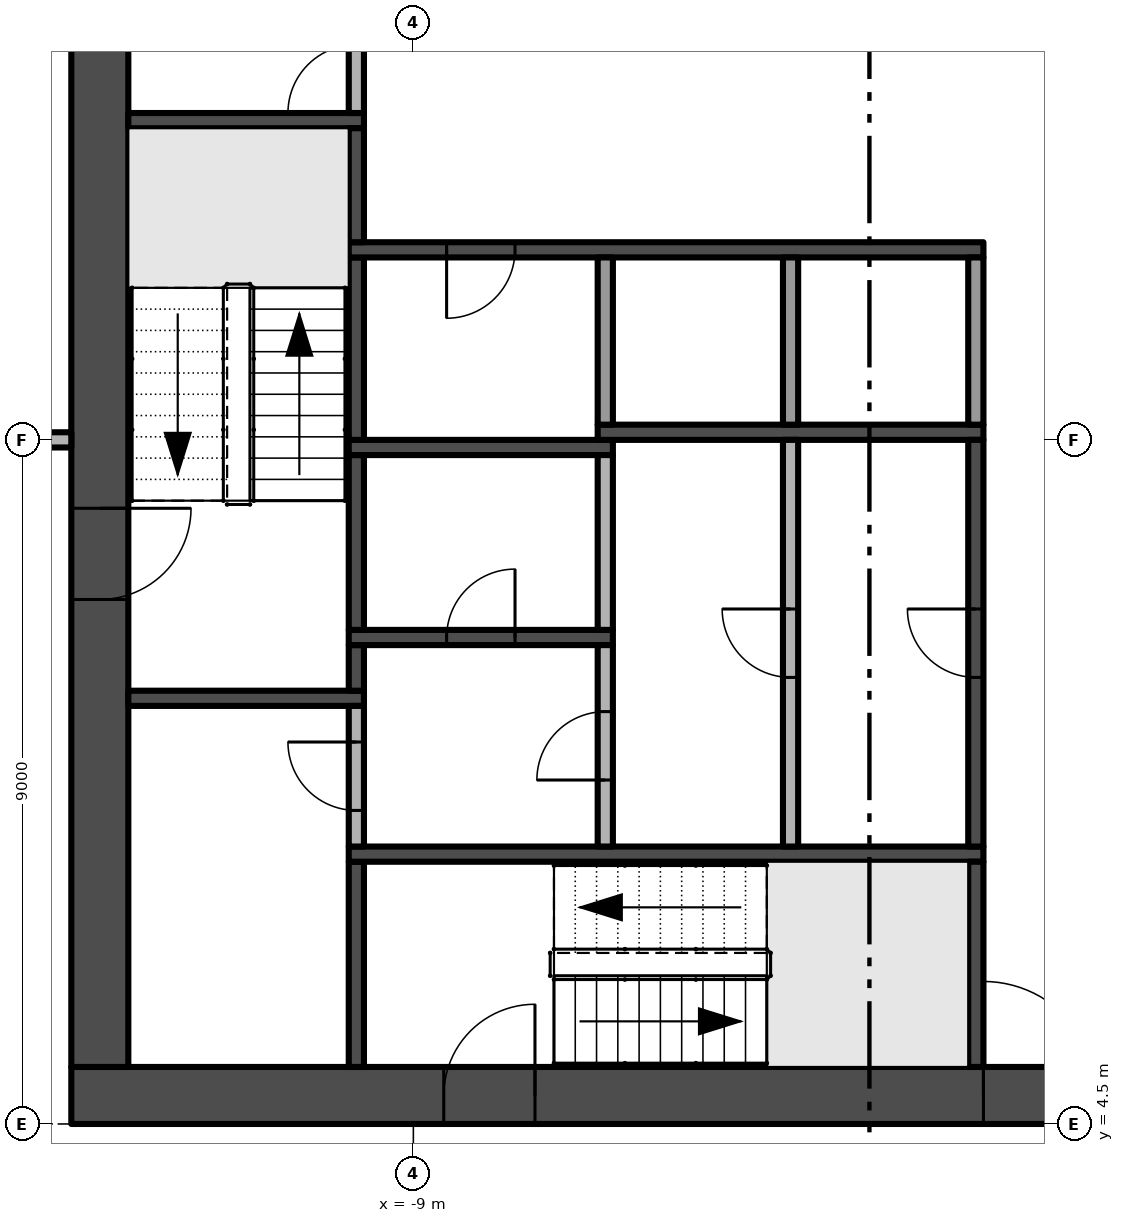
"""IFC4 building model, lengths in metres.
Left out: names, types, materials, properties, quantities, classifications, styles, units other than length and angle.
Written with IfcOpenShell. Run it as: python <this file> out.ifc"""

import sys

from ifc_helpers import new_model, si_unit, direction, frame, frame_2d, origin, place, context, subcontext, project, spatial, rectangle, extrude, element, fill, save


model = new_model("IFC4")
c1 = context("Model", 3, precision=1e-05, world=origin(), true_north=direction((0.0, 1.0)))
c2 = subcontext(c1, "Body", "Model", "MODEL_VIEW")
j1 = project(units=[si_unit("LENGTHUNIT", "METRE"), si_unit("PLANEANGLEUNIT", "RADIAN")], contexts=[c1])
p1 = place(None, origin())
s1 = spatial("IfcSite", under=j1, at=p1, CompositionType="ELEMENT")
p2 = place(p1, origin())
s2 = spatial("IfcBuilding", under=s1, at=p2, CompositionType="ELEMENT")
p3 = place(p2, frame((0.0, 0.0, 128.8)))
s3 = spatial("IfcBuildingStorey", under=s2, at=p3, CompositionType="ELEMENT", Elevation=128.8)
p4 = place(p3, frame((-13.5, 4.875, -0.3), z_axis=(0.0, 0.0, 1.0), x_axis=(1.0, 0.0, 0.0)))
e1 = element("IfcWall", 1, at=p4, inside=s3, PredefinedType="SHEAR", context=c2, shape_type="SweptSolid", body=[
    extrude(rectangle(XDim=27.0, YDim=0.75, at=frame_2d((13.5, 0.0))), origin(), (0.0, 0.0, 1.0), 3.8),
])
p5 = place(p4, frame((12.0, 0.0, 0.3)))
e2 = element("IfcOpeningElement", 2, at=p5, cuts=e1, PredefinedType="OPENING", context=c2, shape_type="SweptSolid", body=[
    extrude(rectangle(XDim=3.0, YDim=2.4, at=frame_2d((1.5, 1.2))), frame((0.0, 0.385, 0.0), z_axis=(0.0, -1.0, 0.0), x_axis=(1.0, 0.0, 0.0)), (0.0, 0.0, 1.0), 0.77),
])
p6 = place(p4, frame((4.9, 0.0, 0.3)))
e3 = element("IfcOpeningElement", 3, at=p6, cuts=e1, PredefinedType="OPENING", context=c2, shape_type="SweptSolid", body=[
    extrude(rectangle(XDim=1.2, YDim=2.2, at=frame_2d((0.6, 1.1))), frame((0.0, 0.385, 0.0), z_axis=(0.0, -1.0, 0.0), x_axis=(1.0, 0.0, 0.0)), (0.0, 0.0, 1.0), 0.77),
])
p7 = place(p4, frame((20.75, 0.0, 0.3)))
e4 = element("IfcOpeningElement", 4, at=p7, cuts=e1, PredefinedType="OPENING", context=c2, shape_type="SweptSolid", body=[
    extrude(rectangle(XDim=1.5, YDim=2.2, at=frame_2d((0.75, 1.1))), frame((0.0, 0.385, 0.0), z_axis=(0.0, -1.0, 0.0), x_axis=(1.0, 0.0, 0.0)), (0.0, 0.0, 1.0), 0.77),
])
p8 = place(p4, frame((17.4, 0.0, 0.3)))
e5 = element("IfcOpeningElement", 5, at=p8, cuts=e1, PredefinedType="OPENING", context=c2, shape_type="SweptSolid", body=[
    extrude(rectangle(XDim=1.2, YDim=2.2, at=frame_2d((0.6, 1.1))), frame((0.0, 0.385, 0.0), z_axis=(0.0, -1.0, 0.0), x_axis=(1.0, 0.0, 0.0)), (0.0, 0.0, 1.0), 0.77),
])
p9 = place(p3, frame((-13.125, 21.75, -0.3), z_axis=(0.0, 0.0, 1.0), x_axis=(0.0, -1.0, 0.0)))
e6 = element("IfcWall", 6, at=p9, inside=s3, PredefinedType="SHEAR", context=c2, shape_type="SweptSolid", body=[
    extrude(rectangle(XDim=16.5, YDim=0.75, at=frame_2d((8.25, 0.0))), origin(), (0.0, 0.0, 1.0), 3.8),
])
p10 = place(p9, frame((9.15, 0.0, 0.3)))
e7 = element("IfcOpeningElement", 7, at=p10, cuts=e6, PredefinedType="OPENING", context=c2, shape_type="SweptSolid", body=[
    extrude(rectangle(XDim=1.2, YDim=2.2, at=frame_2d((0.6, 1.1))), frame((0.0, 0.385, 0.0), z_axis=(0.0, -1.0, 0.0), x_axis=(1.0, 0.0, 0.0)), (0.0, 0.0, 1.0), 0.77),
])
for number, where, z_axis, x_axis in (
    (8, (-12.75, 10.1, 0.0), (0.0, 0.0, 1.0), (1.0, 0.0, 0.0)),
    (9, (-12.75, 17.7, 0.0), (0.0, 0.0, 1.0), (1.0, 0.0, 0.0)),
):
    element("IfcWall", number, at=place(p3, frame(where, z_axis=z_axis, x_axis=x_axis)), inside=s3, PredefinedType="SHEAR", context=c2, shape_type="SweptSolid", body=[
        extrude(rectangle(XDim=3.1, YDim=0.2, at=frame_2d((1.55, 0.0))), origin(), (0.0, 0.0, 1.0), 3.5),
    ])
p11 = place(p3, frame((-9.75, 5.25, 0.0), z_axis=(0.0, 0.0, 1.0), x_axis=(0.0, 1.0, 0.0)))
e10 = element("IfcWall", 10, at=p11, inside=s3, PredefinedType="SHEAR", context=c2, shape_type="SweptSolid", body=[
    extrude(rectangle(XDim=2.7, YDim=0.2, at=frame_2d((1.35, 0.0))), origin(), (0.0, 0.0, 1.0), 3.5),
])
p12 = place(p3, frame((-9.85, 8.05, 0.0), z_axis=(0.0, 0.0, 1.0), x_axis=(1.0, 0.0, 0.0)))
e11 = element("IfcWall", 11, at=p12, inside=s3, PredefinedType="SHEAR", context=c2, shape_type="SweptSolid", body=[
    extrude(rectangle(XDim=8.35, YDim=0.2, at=frame_2d((4.175, 0.0))), origin(), (0.0, 0.0, 1.0), 3.5),
])
p13 = place(p3, frame((-9.75, 8.15, 0.0), z_axis=(0.0, 0.0, 1.0), x_axis=(0.0, 1.0, 0.0)))
e12 = element("IfcWall", 12, at=p13, inside=s3, PredefinedType="PARTITIONING", context=c2, shape_type="SweptSolid", body=[
    extrude(rectangle(XDim=1.85, YDim=0.2, at=frame_2d((0.925, 0.0))), origin(), (0.0, 0.0, 1.0), 3.5),
])
p14 = place(p13, frame((0.475, 0.0, 0.0)))
e13 = element("IfcOpeningElement", 13, at=p14, cuts=e12, PredefinedType="OPENING", context=c2, shape_type="SweptSolid", body=[
    extrude(rectangle(XDim=0.9, YDim=2.1, at=frame_2d((0.45, 1.05))), frame((0.0, 0.11, 0.0), z_axis=(0.0, -1.0, 0.0), x_axis=(1.0, 0.0, 0.0)), (0.0, 0.0, 1.0), 0.22),
])
p15 = place(p3, frame((-9.75, 10.2, 0.0), z_axis=(0.0, 0.0, 1.0), x_axis=(0.0, 1.0, 0.0)))
e14 = element("IfcWall", 14, at=p15, inside=s3, PredefinedType="SHEAR", context=c2, shape_type="SweptSolid", body=[
    extrude(rectangle(XDim=0.6, YDim=0.2, at=frame_2d((0.3, 0.0))), origin(), (0.0, 0.0, 1.0), 3.5),
])
p16 = place(p3, frame((-9.85, 10.9, 0.0), z_axis=(0.0, 0.0, 1.0), x_axis=(1.0, 0.0, 0.0)))
e15 = element("IfcWall", 15, at=p16, inside=s3, PredefinedType="SHEAR", context=c2, shape_type="SweptSolid", body=[
    extrude(rectangle(XDim=3.475, YDim=0.2, at=frame_2d((1.738, 0.0))), origin(), (0.0, 0.0, 1.0), 3.5),
])
p17 = place(p16, frame((1.288, 0.0, 0.0)))
e16 = element("IfcOpeningElement", 16, at=p17, cuts=e15, PredefinedType="OPENING", context=c2, shape_type="SweptSolid", body=[
    extrude(rectangle(XDim=0.9, YDim=2.1, at=frame_2d((0.45, 1.05))), frame((0.0, 0.11, 0.0), z_axis=(0.0, -1.0, 0.0), x_axis=(1.0, 0.0, 0.0)), (0.0, 0.0, 1.0), 0.22),
])
p18 = place(p3, frame((-9.75, 11.0, 0.0), z_axis=(0.0, 0.0, 1.0), x_axis=(0.0, 1.0, 0.0)))
e17 = element("IfcWall", 17, at=p18, inside=s3, PredefinedType="SHEAR", context=c2, shape_type="SweptSolid", body=[
    extrude(rectangle(XDim=2.3, YDim=0.2, at=frame_2d((1.15, 0.0))), origin(), (0.0, 0.0, 1.0), 3.5),
])
p19 = place(p3, frame((-9.85, 13.4, 0.0), z_axis=(0.0, 0.0, 1.0), x_axis=(1.0, 0.0, 0.0)))
e18 = element("IfcWall", 18, at=p19, inside=s3, PredefinedType="SHEAR", context=c2, shape_type="SweptSolid", body=[
    extrude(rectangle(XDim=3.475, YDim=0.2, at=frame_2d((1.738, 0.0))), origin(), (0.0, 0.0, 1.0), 3.5),
])
p20 = place(p3, frame((-9.75, 13.5, 0.0), z_axis=(0.0, 0.0, 1.0), x_axis=(0.0, 1.0, 0.0)))
e19 = element("IfcWall", 19, at=p20, inside=s3, PredefinedType="SHEAR", context=c2, shape_type="SweptSolid", body=[
    extrude(rectangle(XDim=2.4, YDim=0.2, at=frame_2d((1.2, 0.0))), origin(), (0.0, 0.0, 1.0), 3.5),
])
p21 = place(p3, frame((-1.5, 16.0, 0.0), z_axis=(0.0, 0.0, 1.0), x_axis=(-1.0, 0.0, 0.0)))
e20 = element("IfcWall", 20, at=p21, inside=s3, PredefinedType="SHEAR", context=c2, shape_type="SweptSolid", body=[
    extrude(rectangle(XDim=8.35, YDim=0.2, at=frame_2d((4.175, 0.0))), origin(), (0.0, 0.0, 1.0), 3.5),
])
p22 = place(p21, frame((6.162, 0.0, 0.0)))
e21 = element("IfcOpeningElement", 21, at=p22, cuts=e20, PredefinedType="OPENING", context=c2, shape_type="SweptSolid", body=[
    extrude(rectangle(XDim=0.9, YDim=2.1, at=frame_2d((0.45, 1.05))), frame((0.0, 0.11, 0.0), z_axis=(0.0, -1.0, 0.0), x_axis=(1.0, 0.0, 0.0)), (0.0, 0.0, 1.0), 0.22),
])
p23 = place(p3, frame((-9.75, 16.1, 0.0), z_axis=(0.0, 0.0, 1.0), x_axis=(0.0, 1.0, 0.0)))
e22 = element("IfcWall", 22, at=p23, inside=s3, PredefinedType="SHEAR", context=c2, shape_type="SweptSolid", body=[
    extrude(rectangle(XDim=1.5, YDim=0.2, at=frame_2d((0.75, 0.0))), origin(), (0.0, 0.0, 1.0), 3.5),
])
p24 = place(p3, frame((-9.75, 17.8, 0.0), z_axis=(0.0, 0.0, 1.0), x_axis=(0.0, 1.0, 0.0)))
e23 = element("IfcWall", 23, at=p24, inside=s3, PredefinedType="PARTITIONING", context=c2, shape_type="SweptSolid", body=[
    extrude(rectangle(XDim=1.4, YDim=0.2, at=frame_2d((0.7, 0.0))), origin(), (0.0, 0.0, 1.0), 3.5),
])
p25 = place(p24, origin())
e24 = element("IfcOpeningElement", 24, at=p25, cuts=e23, PredefinedType="OPENING", context=c2, shape_type="SweptSolid", body=[
    extrude(rectangle(XDim=0.9, YDim=2.1, at=frame_2d((0.45, 1.05))), frame((0.0, 0.11, 0.0), z_axis=(0.0, -1.0, 0.0), x_axis=(1.0, 0.0, 0.0)), (0.0, 0.0, 1.0), 0.22),
])
p26 = place(p3, frame((-6.475, 8.15, 0.0), z_axis=(0.0, 0.0, 1.0), x_axis=(0.0, 1.0, 0.0)))
e25 = element("IfcWall", 25, at=p26, inside=s3, PredefinedType="PARTITIONING", context=c2, shape_type="SweptSolid", body=[
    extrude(rectangle(XDim=2.65, YDim=0.2, at=frame_2d((1.325, 0.0))), origin(), (0.0, 0.0, 1.0), 3.5),
])
p27 = place(p26, frame((0.875, 0.0, 0.0)))
e26 = element("IfcOpeningElement", 26, at=p27, cuts=e25, PredefinedType="OPENING", context=c2, shape_type="SweptSolid", body=[
    extrude(rectangle(XDim=0.9, YDim=2.1, at=frame_2d((0.45, 1.05))), frame((0.0, 0.11, 0.0), z_axis=(0.0, -1.0, 0.0), x_axis=(1.0, 0.0, 0.0)), (0.0, 0.0, 1.0), 0.22),
])
p28 = place(p3, frame((-6.475, 11.0, 0.0), z_axis=(0.0, 0.0, 1.0), x_axis=(0.0, 1.0, 0.0)))
e27 = element("IfcWall", 27, at=p28, inside=s3, PredefinedType="PARTITIONING", context=c2, shape_type="SweptSolid", body=[
    extrude(rectangle(XDim=2.3, YDim=0.2, at=frame_2d((1.15, 0.0))), origin(), (0.0, 0.0, 1.0), 3.5),
])
p29 = place(p3, frame((-6.575, 13.6, 0.0), z_axis=(0.0, 0.0, 1.0), x_axis=(1.0, 0.0, 0.0)))
e28 = element("IfcWall", 28, at=p29, inside=s3, PredefinedType="SHEAR", context=c2, shape_type="SweptSolid", body=[
    extrude(rectangle(XDim=5.075, YDim=0.2, at=frame_2d((2.538, 0.0))), origin(), (0.0, 0.0, 1.0), 3.5),
])
p30 = place(p3, frame((-6.475, 13.7, 0.0), z_axis=(0.0, 0.0, 1.0), x_axis=(0.0, 1.0, 0.0)))
e29 = element("IfcWall", 29, at=p30, inside=s3, PredefinedType="PARTITIONING", context=c2, shape_type="SweptSolid", body=[
    extrude(rectangle(XDim=2.2, YDim=0.2, at=frame_2d((1.1, 0.0))), origin(), (0.0, 0.0, 1.0), 3.5),
])
p31 = place(p3, frame((-4.037, 8.15, 0.0), z_axis=(0.0, 0.0, 1.0), x_axis=(0.0, 1.0, 0.0)))
e30 = element("IfcWall", 30, at=p31, inside=s3, PredefinedType="PARTITIONING", context=c2, shape_type="SweptSolid", body=[
    extrude(rectangle(XDim=5.35, YDim=0.2, at=frame_2d((2.675, 0.0))), origin(), (0.0, 0.0, 1.0), 3.5),
])
p32 = place(p31, frame((2.225, 0.0, 0.0)))
e31 = element("IfcOpeningElement", 31, at=p32, cuts=e30, PredefinedType="OPENING", context=c2, shape_type="SweptSolid", body=[
    extrude(rectangle(XDim=0.9, YDim=2.1, at=frame_2d((0.45, 1.05))), frame((0.0, 0.11, 0.0), z_axis=(0.0, -1.0, 0.0), x_axis=(1.0, 0.0, 0.0)), (0.0, 0.0, 1.0), 0.22),
])
p33 = place(p3, frame((-4.037, 13.7, 0.0), z_axis=(0.0, 0.0, 1.0), x_axis=(0.0, 1.0, 0.0)))
e32 = element("IfcWall", 32, at=p33, inside=s3, PredefinedType="PARTITIONING", context=c2, shape_type="SweptSolid", body=[
    extrude(rectangle(XDim=2.2, YDim=0.2, at=frame_2d((1.1, 0.0))), origin(), (0.0, 0.0, 1.0), 3.5),
])
p34 = place(p3, frame((-1.6, 5.25, 0.0), z_axis=(0.0, 0.0, 1.0), x_axis=(0.0, 1.0, 0.0)))
e33 = element("IfcWall", 33, at=p34, inside=s3, PredefinedType="SHEAR", context=c2, shape_type="SweptSolid", body=[
    extrude(rectangle(XDim=2.7, YDim=0.2, at=frame_2d((1.35, 0.0))), origin(), (0.0, 0.0, 1.0), 3.5),
])
p35 = place(p3, frame((-1.6, 8.15, 0.0), z_axis=(0.0, 0.0, 1.0), x_axis=(0.0, 1.0, 0.0)))
e34 = element("IfcWall", 34, at=p35, inside=s3, PredefinedType="SHEAR", context=c2, shape_type="SweptSolid", body=[
    extrude(rectangle(XDim=5.35, YDim=0.2, at=frame_2d((2.675, 0.0))), origin(), (0.0, 0.0, 1.0), 3.5),
])
p36 = place(p35, frame((2.225, 0.0, 0.0)))
e35 = element("IfcOpeningElement", 35, at=p36, cuts=e34, PredefinedType="OPENING", context=c2, shape_type="SweptSolid", body=[
    extrude(rectangle(XDim=0.9, YDim=2.1, at=frame_2d((0.45, 1.05))), frame((0.0, 0.11, 0.0), z_axis=(0.0, -1.0, 0.0), x_axis=(1.0, 0.0, 0.0)), (0.0, 0.0, 1.0), 0.22),
])
p37 = place(p3, frame((-1.6, 13.7, 0.0), z_axis=(0.0, 0.0, 1.0), x_axis=(0.0, 1.0, 0.0)))
e36 = element("IfcWall", 36, at=p37, inside=s3, PredefinedType="PARTITIONING", context=c2, shape_type="SweptSolid", body=[
    extrude(rectangle(XDim=2.2, YDim=0.2, at=frame_2d((1.1, 0.0))), origin(), (0.0, 0.0, 1.0), 3.5),
])
p38 = place(p3, frame((-17.35, 13.5, 0.0), z_axis=(0.0, 0.0, 1.0), x_axis=(1.0, 0.0, 0.0)))
e37 = element("IfcWall", 37, at=p38, inside=s3, PredefinedType="PARTITIONING", context=c2, shape_type="SweptSolid", body=[
    extrude(rectangle(XDim=3.85, YDim=0.2, at=frame_2d((1.925, 0.0))), origin(), (0.0, 0.0, 1.0), 3.5),
])
p39 = place(p38, frame((1.35, 0.0, 0.0)))
e38 = element("IfcOpeningElement", 38, at=p39, cuts=e37, PredefinedType="OPENING", context=c2, shape_type="SweptSolid", body=[
    extrude(rectangle(XDim=0.9, YDim=2.1, at=frame_2d((0.45, 1.05))), frame((0.0, 0.11, 0.0), z_axis=(0.0, -1.0, 0.0), x_axis=(1.0, 0.0, 0.0)), (0.0, 0.0, 1.0), 0.22),
])
p40 = place(p5, frame((3.0, 0.0, 0.0), z_axis=(0.0, 0.0, 1.0), x_axis=(-1.0, 0.0, 0.0)))
e39 = element("IfcDoor", 39, at=p40, inside=s3, OperationType="DOUBLE_DOOR_SINGLE_SWING", PredefinedType="DOOR", context=c2, shape_type="SweptSolid", body=[
    extrude(rectangle(XDim=3.0, YDim=2.4, at=frame_2d((1.5, 1.2))), frame((0.0, 0.025, 0.0), z_axis=(0.0, -1.0, 0.0), x_axis=(1.0, 0.0, 0.0)), (0.0, 0.0, 1.0), 0.05),
])
fill(e2, e39)
p41 = place(p10, frame((1.2, 0.0, 0.0), z_axis=(0.0, 0.0, 1.0), x_axis=(-1.0, 0.0, 0.0)))
e40 = element("IfcDoor", 40, at=p41, inside=s3, OperationType="SINGLE_SWING_RIGHT", PredefinedType="DOOR", context=c2, shape_type="SweptSolid", body=[
    extrude(rectangle(XDim=1.2, YDim=2.2, at=frame_2d((0.6, 1.1))), frame((0.0, 0.025, 0.0), z_axis=(0.0, -1.0, 0.0), x_axis=(1.0, 0.0, 0.0)), (0.0, 0.0, 1.0), 0.05),
])
fill(e7, e40)
p42 = place(p6, frame((1.2, 0.0, 0.0), z_axis=(0.0, 0.0, 1.0), x_axis=(-1.0, 0.0, 0.0)))
e41 = element("IfcDoor", 41, at=p42, inside=s3, OperationType="SINGLE_SWING_LEFT", PredefinedType="DOOR", context=c2, shape_type="SweptSolid", body=[
    extrude(rectangle(XDim=1.2, YDim=2.2, at=frame_2d((0.6, 1.1))), frame((0.0, 0.025, 0.0), z_axis=(0.0, -1.0, 0.0), x_axis=(1.0, 0.0, 0.0)), (0.0, 0.0, 1.0), 0.05),
])
fill(e3, e41)
p43 = place(p22, origin())
e42 = element("IfcDoor", 42, at=p43, inside=s3, OperationType="SINGLE_SWING_RIGHT", PredefinedType="DOOR", context=c2, shape_type="SweptSolid", body=[
    extrude(rectangle(XDim=0.9, YDim=2.1, at=frame_2d((0.45, 1.05))), frame((0.0, 0.025, 0.0), z_axis=(0.0, -1.0, 0.0), x_axis=(1.0, 0.0, 0.0)), (0.0, 0.0, 1.0), 0.05),
])
fill(e21, e42)
p44 = place(p36, origin())
e43 = element("IfcDoor", 43, at=p44, inside=s3, OperationType="SINGLE_SWING_RIGHT", PredefinedType="DOOR", context=c2, shape_type="SweptSolid", body=[
    extrude(rectangle(XDim=0.9, YDim=2.1, at=frame_2d((0.45, 1.05))), frame((0.0, 0.025, 0.0), z_axis=(0.0, -1.0, 0.0), x_axis=(1.0, 0.0, 0.0)), (0.0, 0.0, 1.0), 0.05),
])
fill(e35, e43)
p45 = place(p25, origin())
e44 = element("IfcDoor", 44, at=p45, inside=s3, OperationType="SINGLE_SWING_LEFT", PredefinedType="DOOR", context=c2, shape_type="SweptSolid", body=[
    extrude(rectangle(XDim=0.9, YDim=2.1, at=frame_2d((0.45, 1.05))), frame((0.0, 0.025, 0.0), z_axis=(0.0, -1.0, 0.0), x_axis=(1.0, 0.0, 0.0)), (0.0, 0.0, 1.0), 0.05),
])
fill(e24, e44)
p46 = place(p32, origin())
e45 = element("IfcDoor", 45, at=p46, inside=s3, OperationType="SINGLE_SWING_RIGHT", PredefinedType="DOOR", context=c2, shape_type="SweptSolid", body=[
    extrude(rectangle(XDim=0.9, YDim=2.1, at=frame_2d((0.45, 1.05))), frame((0.0, 0.025, 0.0), z_axis=(0.0, -1.0, 0.0), x_axis=(1.0, 0.0, 0.0)), (0.0, 0.0, 1.0), 0.05),
])
fill(e31, e45)
p47 = place(p27, origin())
e46 = element("IfcDoor", 46, at=p47, inside=s3, OperationType="SINGLE_SWING_LEFT", PredefinedType="DOOR", context=c2, shape_type="SweptSolid", body=[
    extrude(rectangle(XDim=0.9, YDim=2.1, at=frame_2d((0.45, 1.05))), frame((0.0, 0.025, 0.0), z_axis=(0.0, -1.0, 0.0), x_axis=(1.0, 0.0, 0.0)), (0.0, 0.0, 1.0), 0.05),
])
fill(e26, e46)
p48 = place(p17, origin())
e47 = element("IfcDoor", 47, at=p48, inside=s3, OperationType="SINGLE_SWING_RIGHT", PredefinedType="DOOR", context=c2, shape_type="SweptSolid", body=[
    extrude(rectangle(XDim=0.9, YDim=2.1, at=frame_2d((0.45, 1.05))), frame((0.0, 0.025, 0.0), z_axis=(0.0, -1.0, 0.0), x_axis=(1.0, 0.0, 0.0)), (0.0, 0.0, 1.0), 0.05),
])
fill(e16, e47)
p49 = place(p14, origin())
e48 = element("IfcDoor", 48, at=p49, inside=s3, OperationType="SINGLE_SWING_RIGHT", PredefinedType="DOOR", context=c2, shape_type="SweptSolid", body=[
    extrude(rectangle(XDim=0.9, YDim=2.1, at=frame_2d((0.45, 1.05))), frame((0.0, 0.025, 0.0), z_axis=(0.0, -1.0, 0.0), x_axis=(1.0, 0.0, 0.0)), (0.0, 0.0, 1.0), 0.05),
])
fill(e13, e48)
save(model, sys.argv[1])
